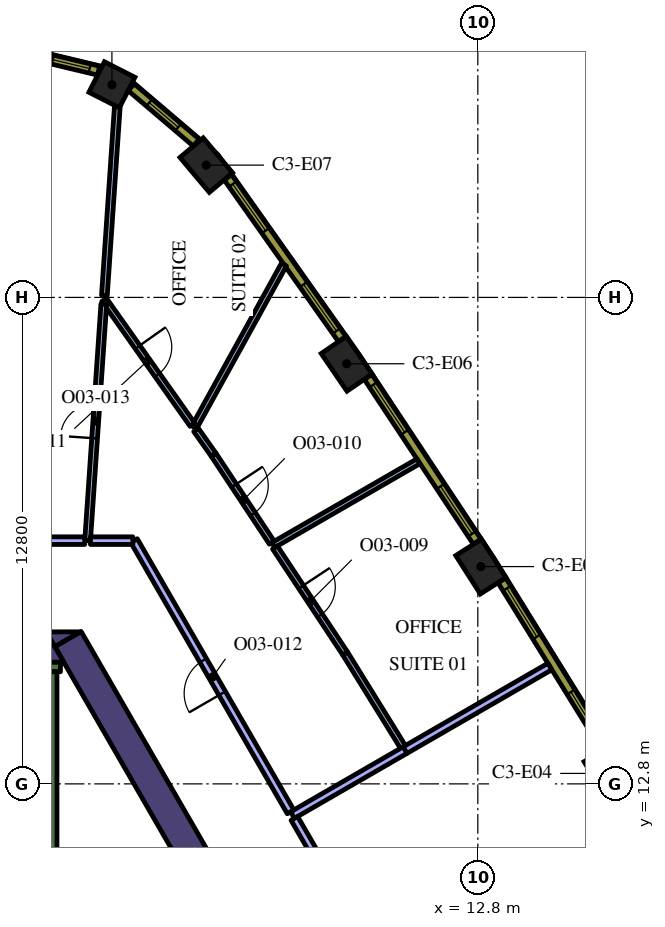
"""IFC4 building model, lengths in metres.
Left out: names, types, materials, properties, quantities, classifications, styles, units other than length and angle.
Written with IfcOpenShell. Run it as: python <this file> out.ifc"""

import sys

from ifc_helpers import new_model, si_unit, direction, frame, frame_2d, origin, origin_2d, place, context, subcontext, project, spatial, polyline, rectangle, outline, extrude, element, fill, save


model = new_model("IFC4")
c1 = context("Model", 3, precision=1e-05, world=origin(), true_north=direction((0.0, 1.0)))
c2 = subcontext(c1, "Body", "Model", "MODEL_VIEW")
j1 = project(units=[si_unit("LENGTHUNIT", "METRE"), si_unit("PLANEANGLEUNIT", "RADIAN")], contexts=[c1])
p1 = place(None, origin())
s1 = spatial("IfcSite", under=j1, at=p1, CompositionType="ELEMENT")
p2 = place(p1, origin())
s2 = spatial("IfcBuilding", under=s1, at=p2, CompositionType="ELEMENT")
p3 = place(p2, frame((0.0, 0.0, 175.2)))
s3 = spatial("IfcBuildingStorey", under=s2, at=p3, CompositionType="ELEMENT", Elevation=175.2)
for number, where, z_axis, x_axis in (
    (1, (16.247, 13.075, 0.0), (0.0, 0.0, 1.0), (-0.513, 0.858, 0.0)),
    (2, (12.88, 18.517, 0.0), (0.0, 0.0, 1.0), (-0.539, 0.842, 0.0)),
    (3, (9.348, 23.854, 0.0), (0.0, 0.0, 1.0), (-0.565, 0.825, 0.0)),
    (4, (5.654, 29.081, 0.0), (0.0, 0.0, 1.0), (-0.644, 0.765, 0.0)),
):
    element("IfcColumn", number, at=place(p3, frame(where, z_axis=z_axis, x_axis=x_axis)), inside=s3, PredefinedType="COLUMN", context=c2, shape_type="SweptSolid", body=[
        extrude(rectangle(XDim=1.2, YDim=0.8, at=origin_2d()), origin(), (0.0, 0.0, 1.0), 4.2),
    ])
p4 = place(p3, frame((3.171, 31.195, 0.0), z_axis=(0.0, 0.0, 1.0), x_axis=(-0.891486197647, 0.453047855535, 0.0)))
e5 = element("IfcColumn", 5, at=p4, inside=s3, PredefinedType="COLUMN", context=c2, shape_type="SweptSolid", body=[
    extrude(rectangle(XDim=0.9, YDim=0.9, at=origin_2d()), origin(), (0.0, 0.0, 1.0), 4.2),
])
p5 = place(p3, frame((8.279, 5.761, 0.0), z_axis=(0.0, 0.0, 1.0), x_axis=(-0.500010359015, 0.866019422922, 0.0)))
e6 = element("IfcWall", 6, at=p5, inside=s3, PredefinedType="SOLIDWALL", context=c2, shape_type="SweptSolid", body=[
    extrude(rectangle(XDim=12.528, YDim=0.8, at=frame_2d((6.264, 0.0))), origin(), (0.0, 0.0, 1.0), 4.2),
])
p6 = place(p3, origin())
e7 = element("IfcWall", 7, at=p6, inside=s3, PredefinedType="SOLIDWALL", context=c2, shape_type="SweptSolid", body=[
    extrude(outline(polyline([(1.443, 16.8), (2.339, 16.8), (1.667, 16.412), (1.443, 16.8)])), origin(), (0.0, 0.0, 1.0), 4.2),
])
e8 = element("IfcWall", 8, at=p6, inside=s3, PredefinedType="SOLIDWALL", context=c2, shape_type="SweptSolid", body=[
    extrude(outline(polyline([(1.905, 16.0), (1.447, 16.0), (1.447, 16.793), (1.905, 16.0)])), origin(), (0.0, 0.0, 1.0), 4.2),
])
p7 = place(p3, frame((-1.817, 15.875, 0.0), z_axis=(0.0, 0.0, 1.0), x_axis=(1.0, 0.0, 0.0)))
e9 = element("IfcWall", 9, at=p7, inside=s3, PredefinedType="SOLIDWALL", context=c2, shape_type="SweptSolid", body=[
    extrude(rectangle(XDim=3.634, YDim=0.25, at=frame_2d((1.817, 0.0))), origin(), (0.0, 0.0, 1.0), 4.2),
])
p8 = place(p3, frame((1.6, 8.95, 0.0), z_axis=(0.0, 0.0, 1.0), x_axis=(0.0, 1.0, 0.0)))
e10 = element("IfcWall", 10, at=p8, inside=s3, PredefinedType="SOLIDWALL", context=c2, shape_type="SweptSolid", body=[
    extrude(rectangle(XDim=6.8, YDim=0.25, at=frame_2d((3.4, 0.0))), origin(), (0.0, 0.0, 1.0), 4.2),
])
p9 = place(p3, frame((10.879, 13.685, 0.0), z_axis=(0.0, 0.0, 1.0), x_axis=(0.866035177799, 0.499983070528, 0.0)))
e11 = element("IfcWall", 11, at=p9, inside=s3, PredefinedType="PARTITIONING", context=c2, shape_type="SweptSolid", body=[
    extrude(rectangle(XDim=4.406, YDim=0.2, at=frame_2d((2.203, 0.0))), origin(), (0.0, 0.0, 1.0), 3.15),
])
p10 = place(p3, frame((7.922, 11.978, 0.0), z_axis=(0.0, 0.0, 1.0), x_axis=(0.866008564848, 0.50002916476, 0.0)))
e12 = element("IfcWall", 12, at=p10, inside=s3, PredefinedType="PARTITIONING", context=c2, shape_type="SweptSolid", body=[
    extrude(rectangle(XDim=3.422, YDim=0.2, at=frame_2d((1.711, 0.0))), origin(), (0.0, 0.0, 1.0), 3.15),
])
p11 = place(p3, frame((9.111, 9.918, 0.0), z_axis=(0.0, 0.0, 1.0), x_axis=(-0.499954382462, 0.86605173948, 0.0)))
e13 = element("IfcWall", 13, at=p11, inside=s3, PredefinedType="PARTITIONING", context=c2, shape_type="SweptSolid", body=[
    extrude(rectangle(XDim=2.278, YDim=0.2, at=frame_2d((1.139, 0.0))), origin(), (0.0, 0.0, 1.0), 3.15),
])
p12 = place(p3, frame((7.42, 19.085, 0.0), z_axis=(0.0, 0.0, 1.0), x_axis=(0.866012184407, 0.500022895934, 0.0)))
e14 = element("IfcWall", 14, at=p12, inside=s3, PredefinedType="PARTITIONING", context=c2, shape_type="SweptSolid", body=[
    extrude(rectangle(XDim=4.408, YDim=0.15, at=frame_2d((2.204, 0.0))), origin(), (0.0, 0.0, 1.0), 3.15),
])
p13 = place(p3, frame((10.83, 13.772, 0.0), z_axis=(0.0, 0.0, 1.0), x_axis=(-0.526229630206, 0.850342505284, 0.0)))
e15 = element("IfcWall", 15, at=p13, inside=s3, PredefinedType="PARTITIONING", context=c2, shape_type="SweptSolid", body=[
    extrude(rectangle(XDim=2.892, YDim=0.15, at=frame_2d((1.446, 0.0))), origin(), (0.0, 0.0, 1.0), 3.15),
])
p14 = place(p3, frame((7.461, 19.022, 0.0), z_axis=(0.0, 0.0, 1.0), x_axis=(0.551902709159, -0.833908507945, 0.0)))
e16 = element("IfcWall", 16, at=p14, inside=s3, PredefinedType="PARTITIONING", context=c2, shape_type="SweptSolid", body=[
    extrude(rectangle(XDim=3.347, YDim=0.15, at=frame_2d((1.673, 0.0))), origin(), (0.0, 0.0, 1.0), 3.15),
])
p15 = place(p14, frame((1.247, 0.0, 0.0)))
e17 = element("IfcOpeningElement", 17, at=p15, cuts=e16, PredefinedType="OPENING", context=c2, shape_type="SweptSolid", body=[
    extrude(rectangle(XDim=0.9, YDim=2.1, at=frame_2d((0.45, 1.05))), frame((0.0, 0.085, 0.0), z_axis=(0.0, -1.0, 0.0), x_axis=(1.0, 0.0, 0.0)), (0.0, 0.0, 1.0), 0.17),
])
p16 = place(p3, frame((5.337, 22.183, 0.0), z_axis=(0.0, 0.0, 1.0), x_axis=(0.482995509385, 0.875622828571, 0.0)))
e18 = element("IfcWall", 18, at=p16, inside=s3, PredefinedType="PARTITIONING", context=c2, shape_type="SweptSolid", body=[
    extrude(rectangle(XDim=4.89, YDim=0.15, at=frame_2d((2.445, 0.0))), origin(), (0.0, 0.0, 1.0), 3.15),
])
p17 = place(p3, frame((5.848, 21.46, 0.0), z_axis=(0.0, 0.0, 1.0), x_axis=(0.551934419249, -0.833887520502, 0.0)))
e19 = element("IfcWall", 19, at=p17, inside=s3, PredefinedType="PARTITIONING", context=c2, shape_type="SweptSolid", body=[
    extrude(rectangle(XDim=2.773, YDim=0.15, at=frame_2d((1.387, 0.0))), origin(), (0.0, 0.0, 1.0), 3.15),
])
p18 = place(p17, frame((0.973, 0.0, 0.0)))
e20 = element("IfcOpeningElement", 20, at=p18, cuts=e19, PredefinedType="OPENING", context=c2, shape_type="SweptSolid", body=[
    extrude(rectangle(XDim=0.9, YDim=2.1, at=frame_2d((0.45, 1.05))), frame((0.0, 0.085, 0.0), z_axis=(0.0, -1.0, 0.0), x_axis=(1.0, 0.0, 0.0)), (0.0, 0.0, 1.0), 0.17),
])
p19 = place(p3, frame((5.848, 21.46, 0.0), z_axis=(0.0, 0.0, 1.0), x_axis=(-0.577113333385, 0.816664068286, 0.0)))
e21 = element("IfcWall", 21, at=p19, inside=s3, PredefinedType="PARTITIONING", context=c2, shape_type="SweptSolid", body=[
    extrude(rectangle(XDim=0.802, YDim=0.15, at=frame_2d((0.401, 0.0))), origin(), (0.0, 0.0, 1.0), 3.15),
])
p20 = place(p3, frame((2.966, 25.539, 0.0), z_axis=(0.0, 0.0, 1.0), x_axis=(0.577099839594, -0.816673603798, 0.0)))
e22 = element("IfcWall", 22, at=p20, inside=s3, PredefinedType="PARTITIONING", context=c2, shape_type="SweptSolid", body=[
    extrude(rectangle(XDim=4.025, YDim=0.15, at=frame_2d((2.013, 0.0))), origin(), (0.0, 0.0, 1.0), 3.15),
])
p21 = place(p20, frame((1.525, 0.0, 0.0)))
e23 = element("IfcOpeningElement", 23, at=p21, cuts=e22, PredefinedType="OPENING", context=c2, shape_type="SweptSolid", body=[
    extrude(rectangle(XDim=0.9, YDim=2.1, at=frame_2d((0.45, 1.05))), frame((0.0, 0.085, 0.0), z_axis=(0.0, -1.0, 0.0), x_axis=(1.0, 0.0, 0.0)), (0.0, 0.0, 1.0), 0.17),
])
p22 = place(p3, frame((2.974, 25.657, 0.0), z_axis=(0.0, 0.0, 1.0), x_axis=(0.068301586051, 0.997664719905, 0.0)))
e24 = element("IfcWall", 24, at=p22, inside=s3, PredefinedType="PARTITIONING", context=c2, shape_type="SweptSolid", body=[
    extrude(rectangle(XDim=4.972, YDim=0.15, at=frame_2d((2.486, 0.0))), origin(), (0.0, 0.0, 1.0), 3.15),
])
p23 = place(p3, frame((2.531, 19.2, 0.0), z_axis=(0.0, 0.0, 1.0), x_axis=(0.06832771358, 0.997662930832, 0.0)))
e25 = element("IfcWall", 25, at=p23, inside=s3, PredefinedType="PARTITIONING", context=c2, shape_type="SweptSolid", body=[
    extrude(rectangle(XDim=6.235, YDim=0.15, at=frame_2d((3.118, 0.0))), origin(), (0.0, 0.0, 1.0), 3.15),
])
p24 = place(p23, frame((2.7, 0.0, 0.0)))
e26 = element("IfcOpeningElement", 26, at=p24, cuts=e25, PredefinedType="OPENING", context=c2, shape_type="SweptSolid", body=[
    extrude(rectangle(XDim=0.9, YDim=2.1, at=frame_2d((0.45, 1.05))), frame((0.0, 0.085, 0.0), z_axis=(0.0, -1.0, 0.0), x_axis=(1.0, 0.0, 0.0)), (0.0, 0.0, 1.0), 0.17),
])
p25 = place(p3, frame((7.872, 12.064, 0.0), z_axis=(0.0, 0.0, 1.0), x_axis=(-0.499995192696, 0.866028179265, 0.0)))
e27 = element("IfcWall", 27, at=p25, inside=s3, PredefinedType="PARTITIONING", context=c2, shape_type="SweptSolid", body=[
    extrude(rectangle(XDim=8.239, YDim=0.2, at=frame_2d((4.12, 0.0))), origin(), (0.0, 0.0, 1.0), 3.15),
])
p26 = place(p25, frame((3.6, 0.0, 0.0)))
e28 = element("IfcOpeningElement", 28, at=p26, cuts=e27, PredefinedType="OPENING", context=c2, shape_type="SweptSolid", body=[
    extrude(rectangle(XDim=1.0, YDim=2.1, at=frame_2d((0.5, 1.05))), frame((0.0, 0.11, 0.0), z_axis=(0.0, -1.0, 0.0), x_axis=(1.0, 0.0, 0.0)), (0.0, 0.0, 1.0), 0.22),
])
p27 = place(p3, frame((3.723, 19.2, 0.0), z_axis=(0.0, 0.0, 1.0), x_axis=(-1.0, 0.0, 0.0)))
e29 = element("IfcWall", 29, at=p27, inside=s3, PredefinedType="PARTITIONING", context=c2, shape_type="SweptSolid", body=[
    extrude(rectangle(XDim=1.116, YDim=0.2, at=frame_2d((0.558, 0.0))), origin(), (0.0, 0.0, 1.0), 3.15),
])
p28 = place(p3, frame((2.456, 19.2, 0.0), z_axis=(0.0, 0.0, 1.0), x_axis=(-1.0, 0.0, 0.0)))
e30 = element("IfcWall", 30, at=p28, inside=s3, PredefinedType="PARTITIONING", context=c2, shape_type="SweptSolid", body=[
    extrude(rectangle(XDim=5.41, YDim=0.2, at=frame_2d((2.705, 0.0))), origin(), (0.0, 0.0, 1.0), 3.15),
])
p29 = place(p3, frame((16.171, 13.731, 0.0), z_axis=(0.0, 0.0, 1.0), x_axis=(-0.526197926587, 0.850362124072, 0.0)))
e31 = element("IfcWall", 31, at=p29, inside=s3, PredefinedType="SOLIDWALL", context=c2, shape_type="SweptSolid", body=[
    extrude(rectangle(XDim=5.203, YDim=0.24, at=frame_2d((2.602, 0.0))), origin(), (0.0, 0.0, 1.0), 3.95),
])
p30 = place(p29, frame((0.248, 0.0, 0.9)))
e32 = element("IfcOpeningElement", 32, at=p30, cuts=e31, PredefinedType="OPENING", context=c2, shape_type="SweptSolid", body=[
    extrude(rectangle(XDim=1.5, YDim=2.55, at=frame_2d((0.75, 1.275))), frame((0.0, 0.13, 0.0), z_axis=(0.0, -1.0, 0.0), x_axis=(1.0, 0.0, 0.0)), (0.0, 0.0, 1.0), 0.26),
])
p31 = place(p29, frame((3.455, 0.0, 0.9)))
e33 = element("IfcOpeningElement", 33, at=p31, cuts=e31, PredefinedType="OPENING", context=c2, shape_type="SweptSolid", body=[
    extrude(rectangle(XDim=1.5, YDim=2.55, at=frame_2d((0.75, 1.275))), frame((0.0, 0.13, 0.0), z_axis=(0.0, -1.0, 0.0), x_axis=(1.0, 0.0, 0.0)), (0.0, 0.0, 1.0), 0.26),
])
p32 = place(p3, frame((12.783, 19.171, 0.0), z_axis=(0.0, 0.0, 1.0), x_axis=(-0.551892811511, 0.833915058386, 0.0)))
e34 = element("IfcWall", 34, at=p32, inside=s3, PredefinedType="SOLIDWALL", context=c2, shape_type="SweptSolid", body=[
    extrude(rectangle(XDim=5.204, YDim=0.24, at=frame_2d((2.602, 0.0))), origin(), (0.0, 0.0, 1.0), 3.95),
])
p33 = place(p32, frame((0.248, 0.0, 0.9)))
e35 = element("IfcOpeningElement", 35, at=p33, cuts=e34, PredefinedType="OPENING", context=c2, shape_type="SweptSolid", body=[
    extrude(rectangle(XDim=1.5, YDim=2.55, at=frame_2d((0.75, 1.275))), frame((0.0, 0.13, 0.0), z_axis=(0.0, -1.0, 0.0), x_axis=(1.0, 0.0, 0.0)), (0.0, 0.0, 1.0), 0.26),
])
p34 = place(p32, frame((3.455, 0.0, 0.9)))
e36 = element("IfcOpeningElement", 36, at=p34, cuts=e34, PredefinedType="OPENING", context=c2, shape_type="SweptSolid", body=[
    extrude(rectangle(XDim=1.5, YDim=2.55, at=frame_2d((0.75, 1.275))), frame((0.0, 0.13, 0.0), z_axis=(0.0, -1.0, 0.0), x_axis=(1.0, 0.0, 0.0)), (0.0, 0.0, 1.0), 0.26),
])
p35 = place(p3, frame((9.231, 24.504, 0.0), z_axis=(0.0, 0.0, 1.0), x_axis=(-0.577115207679, 0.816662743772, 0.0)))
e37 = element("IfcWall", 37, at=p35, inside=s3, PredefinedType="SOLIDWALL", context=c2, shape_type="SweptSolid", body=[
    extrude(rectangle(XDim=5.213, YDim=0.24, at=frame_2d((2.606, 0.0))), origin(), (0.0, 0.0, 1.0), 3.95),
])
p36 = place(p35, frame((0.261, 0.0, 0.9)))
e38 = element("IfcOpeningElement", 38, at=p36, cuts=e37, PredefinedType="OPENING", context=c2, shape_type="SweptSolid", body=[
    extrude(rectangle(XDim=1.5, YDim=2.55, at=frame_2d((0.75, 1.275))), frame((0.0, 0.13, 0.0), z_axis=(0.0, -1.0, 0.0), x_axis=(1.0, 0.0, 0.0)), (0.0, 0.0, 1.0), 0.26),
])
p37 = place(p35, frame((3.492, 0.0, 0.9)))
e39 = element("IfcOpeningElement", 39, at=p37, cuts=e37, PredefinedType="OPENING", context=c2, shape_type="SweptSolid", body=[
    extrude(rectangle(XDim=1.5, YDim=2.55, at=frame_2d((0.75, 1.275))), frame((0.0, 0.13, 0.0), z_axis=(0.0, -1.0, 0.0), x_axis=(1.0, 0.0, 0.0)), (0.0, 0.0, 1.0), 0.26),
])
p38 = place(p3, frame((5.392, 29.672, 0.0), z_axis=(0.0, 0.0, 1.0), x_axis=(-0.761419744247, 0.648259186645, 0.0)))
e40 = element("IfcWall", 40, at=p38, inside=s3, PredefinedType="SOLIDWALL", context=c2, shape_type="SweptSolid", body=[
    extrude(rectangle(XDim=2.25, YDim=0.24, at=frame_2d((1.125, 0.0))), origin(), (0.0, 0.0, 1.0), 3.95),
])
p39 = place(p38, frame((0.625, 0.0, 0.9)))
e41 = element("IfcOpeningElement", 41, at=p39, cuts=e40, PredefinedType="OPENING", context=c2, shape_type="SweptSolid", body=[
    extrude(rectangle(XDim=1.0, YDim=2.55, at=frame_2d((0.5, 1.275))), frame((0.0, 0.13, 0.0), z_axis=(0.0, -1.0, 0.0), x_axis=(1.0, 0.0, 0.0)), (0.0, 0.0, 1.0), 0.26),
])
p40 = place(p3, frame((2.821, 31.566, 0.0), z_axis=(0.0, 0.0, 1.0), x_axis=(-0.972479955788, 0.232986556673, 0.0)))
e42 = element("IfcWall", 42, at=p40, inside=s3, PredefinedType="SOLIDWALL", context=c2, shape_type="SweptSolid", body=[
    extrude(rectangle(XDim=1.482, YDim=0.24, at=frame_2d((0.741, 0.0))), origin(), (0.0, 0.0, 1.0), 3.95),
])
p41 = place(p40, frame((0.241, 0.0, 0.9)))
e43 = element("IfcOpeningElement", 43, at=p41, cuts=e42, PredefinedType="OPENING", context=c2, shape_type="SweptSolid", body=[
    extrude(rectangle(XDim=1.0, YDim=2.55, at=frame_2d((0.5, 1.275))), frame((0.0, 0.13, 0.0), z_axis=(0.0, -1.0, 0.0), x_axis=(1.0, 0.0, 0.0)), (0.0, 0.0, 1.0), 0.26),
])
p42 = place(p15, origin())
e44 = element("IfcDoor", 44, at=p42, inside=s3, OperationType="SINGLE_SWING_RIGHT", PredefinedType="DOOR", context=c2, shape_type="SweptSolid", body=[
    extrude(rectangle(XDim=0.9, YDim=2.1, at=frame_2d((0.45, 1.05))), frame((0.0, 0.025, 0.0), z_axis=(0.0, -1.0, 0.0), x_axis=(1.0, 0.0, 0.0)), (0.0, 0.0, 1.0), 0.05),
])
fill(e17, e44)
p43 = place(p18, origin())
e45 = element("IfcDoor", 45, at=p43, inside=s3, OperationType="SINGLE_SWING_RIGHT", PredefinedType="DOOR", context=c2, shape_type="SweptSolid", body=[
    extrude(rectangle(XDim=0.9, YDim=2.1, at=frame_2d((0.45, 1.05))), frame((0.0, 0.025, 0.0), z_axis=(0.0, -1.0, 0.0), x_axis=(1.0, 0.0, 0.0)), (0.0, 0.0, 1.0), 0.05),
])
fill(e20, e45)
p44 = place(p21, origin())
e46 = element("IfcDoor", 46, at=p44, inside=s3, OperationType="SINGLE_SWING_LEFT", PredefinedType="DOOR", context=c2, shape_type="SweptSolid", body=[
    extrude(rectangle(XDim=0.9, YDim=2.1, at=frame_2d((0.45, 1.05))), frame((0.0, 0.025, 0.0), z_axis=(0.0, -1.0, 0.0), x_axis=(1.0, 0.0, 0.0)), (0.0, 0.0, 1.0), 0.05),
])
fill(e23, e46)
p45 = place(p26, origin())
e47 = element("IfcDoor", 47, at=p45, inside=s3, OperationType="SINGLE_SWING_LEFT", PredefinedType="DOOR", context=c2, shape_type="SweptSolid", body=[
    extrude(rectangle(XDim=1.0, YDim=2.1, at=frame_2d((0.5, 1.05))), frame((0.0, 0.025, 0.0), z_axis=(0.0, -1.0, 0.0), x_axis=(1.0, 0.0, 0.0)), (0.0, 0.0, 1.0), 0.05),
])
fill(e28, e47)
p46 = place(p24, origin())
e48 = element("IfcDoor", 48, at=p46, inside=s3, OperationType="SINGLE_SWING_RIGHT", PredefinedType="DOOR", context=c2, shape_type="SweptSolid", body=[
    extrude(rectangle(XDim=0.9, YDim=2.1, at=frame_2d((0.45, 1.05))), frame((0.0, 0.025, 0.0), z_axis=(0.0, -1.0, 0.0), x_axis=(1.0, 0.0, 0.0)), (0.0, 0.0, 1.0), 0.05),
])
fill(e26, e48)
p47 = place(p30, origin())
e49 = element("IfcWindow", 49, at=p47, inside=s3, PartitioningType="SINGLE_PANEL", PredefinedType="WINDOW", context=c2, shape_type="SweptSolid", body=[
    extrude(rectangle(XDim=1.5, YDim=2.55, at=frame_2d((0.75, 1.275))), frame((0.0, 0.04, 0.0), z_axis=(0.0, -1.0, 0.0), x_axis=(1.0, 0.0, 0.0)), (0.0, 0.0, 1.0), 0.06),
])
fill(e32, e49)
p48 = place(p31, origin())
e50 = element("IfcWindow", 50, at=p48, inside=s3, PartitioningType="SINGLE_PANEL", PredefinedType="WINDOW", context=c2, shape_type="SweptSolid", body=[
    extrude(rectangle(XDim=1.5, YDim=2.55, at=frame_2d((0.75, 1.275))), frame((0.0, 0.04, 0.0), z_axis=(0.0, -1.0, 0.0), x_axis=(1.0, 0.0, 0.0)), (0.0, 0.0, 1.0), 0.06),
])
fill(e33, e50)
p49 = place(p33, origin())
e51 = element("IfcWindow", 51, at=p49, inside=s3, PartitioningType="SINGLE_PANEL", PredefinedType="WINDOW", context=c2, shape_type="SweptSolid", body=[
    extrude(rectangle(XDim=1.5, YDim=2.55, at=frame_2d((0.75, 1.275))), frame((0.0, 0.04, 0.0), z_axis=(0.0, -1.0, 0.0), x_axis=(1.0, 0.0, 0.0)), (0.0, 0.0, 1.0), 0.06),
])
fill(e35, e51)
p50 = place(p34, origin())
e52 = element("IfcWindow", 52, at=p50, inside=s3, PartitioningType="SINGLE_PANEL", PredefinedType="WINDOW", context=c2, shape_type="SweptSolid", body=[
    extrude(rectangle(XDim=1.5, YDim=2.55, at=frame_2d((0.75, 1.275))), frame((0.0, 0.04, 0.0), z_axis=(0.0, -1.0, 0.0), x_axis=(1.0, 0.0, 0.0)), (0.0, 0.0, 1.0), 0.06),
])
fill(e36, e52)
p51 = place(p36, origin())
e53 = element("IfcWindow", 53, at=p51, inside=s3, PartitioningType="SINGLE_PANEL", PredefinedType="WINDOW", context=c2, shape_type="SweptSolid", body=[
    extrude(rectangle(XDim=1.5, YDim=2.55, at=frame_2d((0.75, 1.275))), frame((0.0, 0.04, 0.0), z_axis=(0.0, -1.0, 0.0), x_axis=(1.0, 0.0, 0.0)), (0.0, 0.0, 1.0), 0.06),
])
fill(e38, e53)
p52 = place(p37, origin())
e54 = element("IfcWindow", 54, at=p52, inside=s3, PartitioningType="SINGLE_PANEL", PredefinedType="WINDOW", context=c2, shape_type="SweptSolid", body=[
    extrude(rectangle(XDim=1.5, YDim=2.55, at=frame_2d((0.75, 1.275))), frame((0.0, 0.04, 0.0), z_axis=(0.0, -1.0, 0.0), x_axis=(1.0, 0.0, 0.0)), (0.0, 0.0, 1.0), 0.06),
])
fill(e39, e54)
p53 = place(p39, origin())
e55 = element("IfcWindow", 55, at=p53, inside=s3, PartitioningType="SINGLE_PANEL", PredefinedType="WINDOW", context=c2, shape_type="SweptSolid", body=[
    extrude(rectangle(XDim=1.0, YDim=2.55, at=frame_2d((0.5, 1.275))), frame((0.0, 0.04, 0.0), z_axis=(0.0, -1.0, 0.0), x_axis=(1.0, 0.0, 0.0)), (0.0, 0.0, 1.0), 0.06),
])
fill(e41, e55)
p54 = place(p41, origin())
e56 = element("IfcWindow", 56, at=p54, inside=s3, PartitioningType="SINGLE_PANEL", PredefinedType="WINDOW", context=c2, shape_type="SweptSolid", body=[
    extrude(rectangle(XDim=1.0, YDim=2.55, at=frame_2d((0.5, 1.275))), frame((0.0, 0.04, 0.0), z_axis=(0.0, -1.0, 0.0), x_axis=(1.0, 0.0, 0.0)), (0.0, 0.0, 1.0), 0.06),
])
fill(e43, e56)
save(model, sys.argv[1])
